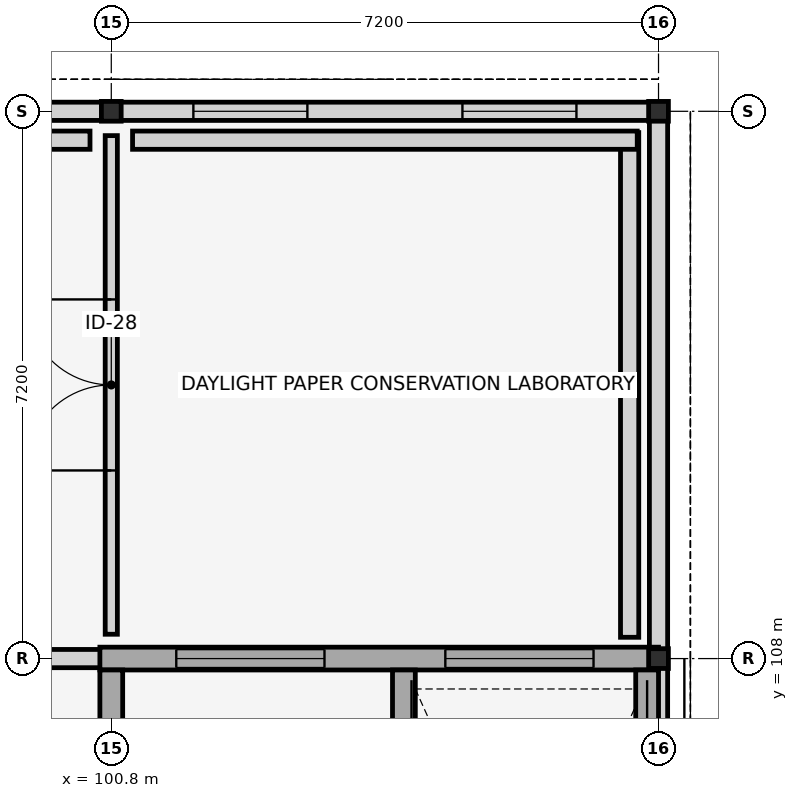
"""IFC4 building model, lengths in metres.
Left out: names, types, materials, properties, quantities, classifications, styles, units other than length and angle.
Written with IfcOpenShell. Run it as: python <this file> out.ifc"""

import sys

from ifc_helpers import new_model, si_unit, direction, frame, frame_2d, origin, origin_2d, place, context, subcontext, project, spatial, polyline, rectangle, i_section, outline, extrude, element, fill, save


model = new_model("IFC4")
c1 = context("Model", 3, precision=1e-05, world=origin(), true_north=direction((0.0, 1.0)))
c2 = subcontext(c1, "Body", "Model", "MODEL_VIEW")
j1 = project(units=[si_unit("LENGTHUNIT", "METRE"), si_unit("PLANEANGLEUNIT", "RADIAN")], contexts=[c1])
p1 = place(None, origin())
s1 = spatial("IfcSite", under=j1, at=p1, CompositionType="ELEMENT")
p2 = place(p1, origin())
s2 = spatial("IfcBuilding", under=s1, at=p2, CompositionType="ELEMENT")
p3 = place(p2, frame((0.0, 0.0, 25.2)))
s3 = spatial("IfcBuildingStorey", under=s2, at=p3, CompositionType="ELEMENT", Elevation=25.2)
for number, where, z_axis, x_axis in (
    (1, (100.8, 115.2, 0.0), (0.0, 0.0, 1.0), (0.0, 1.0, 0.0)),
    (2, (108.0, 108.0, 0.0), (0.0, 0.0, 1.0), (0.0, 1.0, 0.0)),
    (3, (108.0, 115.2, 0.0), (0.0, 0.0, 1.0), (1.0, 0.0, 0.0)),
):
    element("IfcColumn", number, at=place(p3, frame(where, z_axis=z_axis, x_axis=x_axis)), inside=s3, PredefinedType="COLUMN", context=c2, shape_type="SweptSolid", body=[
        extrude(i_section(OverallWidth=0.26, OverallDepth=0.26, WebThickness=0.01, FlangeThickness=0.018, FilletRadius=0.024, at=origin_2d()), origin(), (0.0, 0.0, 1.0), 5.4),
    ])
for number, where, z_axis, x_axis in (
    (4, (107.62, 108.28, 0.0), (0.0, 0.0, 1.0), (0.0, 1.0, 0.0)),
    (5, (107.72, 114.82, 0.0), (0.0, 0.0, 1.0), (-1.0, 0.0, 0.0)),
):
    element("IfcWall", number, at=place(p3, frame(where, z_axis=z_axis, x_axis=x_axis)), inside=s3, PredefinedType="STANDARD", context=c2, shape_type="SweptSolid", body=[
        extrude(rectangle(XDim=6.64, YDim=0.24, at=frame_2d((3.32, 0.0))), origin(), (0.0, 0.0, 1.0), 4.78),
    ])
p4 = place(p3, frame((100.52, 114.82, 0.0), z_axis=(0.0, 0.0, 1.0), x_axis=(-1.0, 0.0, 0.0)))
e6 = element("IfcWall", 6, at=p4, inside=s3, PredefinedType="STANDARD", context=c2, shape_type="SweptSolid", body=[
    extrude(rectangle(XDim=6.64, YDim=0.24, at=frame_2d((3.32, 0.0))), origin(), (0.0, 0.0, 1.0), 4.78),
])
p5 = place(p3, frame((100.74, 108.0, 5.42), z_axis=(0.0, 0.0, 1.0), x_axis=(-1.0, 0.0, 0.0)))
e7 = element("IfcWall", 7, at=p5, inside=s3, PredefinedType="STANDARD", context=c2, shape_type="SweptSolid", body=[
    extrude(rectangle(XDim=7.08, YDim=0.24, at=frame_2d((3.54, 0.0))), origin(), (0.0, 0.0, 1.0), 6.46),
])
p6 = place(p5, frame((0.87, 0.0, 0.7)))
e8 = element("IfcOpeningElement", 8, at=p6, cuts=e7, PredefinedType="OPENING", context=c2, shape_type="SweptSolid", body=[
    extrude(rectangle(XDim=1.8, YDim=2.4, at=frame_2d((0.9, 1.2))), frame((0.0, 0.13, 0.0), z_axis=(0.0, -1.0, 0.0), x_axis=(1.0, 0.0, 0.0)), (0.0, 0.0, 1.0), 0.26),
])
p7 = place(p5, frame((4.41, 0.0, 0.7)))
e9 = element("IfcOpeningElement", 9, at=p7, cuts=e7, PredefinedType="OPENING", context=c2, shape_type="SweptSolid", body=[
    extrude(rectangle(XDim=1.8, YDim=2.4, at=frame_2d((0.9, 1.2))), frame((0.0, 0.13, 0.0), z_axis=(0.0, -1.0, 0.0), x_axis=(1.0, 0.0, 0.0)), (0.0, 0.0, 1.0), 0.26),
])
p8 = place(p3, frame((107.94, 108.0, 5.42), z_axis=(0.0, 0.0, 1.0), x_axis=(-1.0, 0.0, 0.0)))
e10 = element("IfcWall", 10, at=p8, inside=s3, PredefinedType="STANDARD", context=c2, shape_type="SweptSolid", body=[
    extrude(rectangle(XDim=7.08, YDim=0.24, at=frame_2d((3.54, 0.0))), origin(), (0.0, 0.0, 1.0), 6.46),
])
p9 = place(p8, frame((0.795, 0.0, 0.7)))
e11 = element("IfcOpeningElement", 11, at=p9, cuts=e10, PredefinedType="OPENING", context=c2, shape_type="SweptSolid", body=[
    extrude(rectangle(XDim=1.95, YDim=2.5, at=frame_2d((0.975, 1.25))), frame((0.0, 0.13, 0.0), z_axis=(0.0, -1.0, 0.0), x_axis=(1.0, 0.0, 0.0)), (0.0, 0.0, 1.0), 0.26),
])
p10 = place(p8, frame((4.335, 0.0, 0.7)))
e12 = element("IfcOpeningElement", 12, at=p10, cuts=e10, PredefinedType="OPENING", context=c2, shape_type="SweptSolid", body=[
    extrude(rectangle(XDim=1.95, YDim=2.5, at=frame_2d((0.975, 1.25))), frame((0.0, 0.13, 0.0), z_axis=(0.0, -1.0, 0.0), x_axis=(1.0, 0.0, 0.0)), (0.0, 0.0, 1.0), 0.26),
])
p11 = place(p3, frame((108.0, 100.8, 5.42), z_axis=(0.0, 0.0, 1.0), x_axis=(0.0, 1.0, 0.0)))
e13 = element("IfcWall", 13, at=p11, inside=s3, PredefinedType="STANDARD", context=c2, shape_type="SweptSolid", body=[
    extrude(outline(polyline([(0.0, 0.0), (7.2, 0.0), (7.2, 6.46), (0.0, 0.13), (0.0, 0.0)])), frame((0.0, 0.12, 0.0), z_axis=(0.0, -1.0, 0.0), x_axis=(1.0, 0.0, 0.0)), (0.0, 0.0, 1.0), 0.24),
])
p12 = place(p3, frame((100.74, 115.2, 5.42), z_axis=(0.0, 0.0, 1.0), x_axis=(-1.0, 0.0, 0.0)))
e14 = element("IfcWall", 14, at=p12, inside=s3, PredefinedType="STANDARD", context=c2, shape_type="SweptSolid", body=[
    extrude(rectangle(XDim=7.08, YDim=0.24, at=frame_2d((3.54, 0.0))), origin(), (0.0, 0.0, 1.0), 6.46),
])
p13 = place(p12, frame((0.795, 0.0, 0.7)))
e15 = element("IfcOpeningElement", 15, at=p13, cuts=e14, PredefinedType="OPENING", context=c2, shape_type="SweptSolid", body=[
    extrude(rectangle(XDim=1.95, YDim=2.5, at=frame_2d((0.975, 1.25))), frame((0.0, 0.13, 0.0), z_axis=(0.0, -1.0, 0.0), x_axis=(1.0, 0.0, 0.0)), (0.0, 0.0, 1.0), 0.26),
])
p14 = place(p12, frame((4.335, 0.0, 0.7)))
e16 = element("IfcOpeningElement", 16, at=p14, cuts=e14, PredefinedType="OPENING", context=c2, shape_type="SweptSolid", body=[
    extrude(rectangle(XDim=1.95, YDim=2.5, at=frame_2d((0.975, 1.25))), frame((0.0, 0.13, 0.0), z_axis=(0.0, -1.0, 0.0), x_axis=(1.0, 0.0, 0.0)), (0.0, 0.0, 1.0), 0.26),
])
p15 = place(p3, frame((107.94, 115.2, 5.42), z_axis=(0.0, 0.0, 1.0), x_axis=(-1.0, 0.0, 0.0)))
e17 = element("IfcWall", 17, at=p15, inside=s3, PredefinedType="STANDARD", context=c2, shape_type="SweptSolid", body=[
    extrude(rectangle(XDim=7.08, YDim=0.24, at=frame_2d((3.54, 0.0))), origin(), (0.0, 0.0, 1.0), 6.46),
])
p16 = place(p15, frame((1.02, 0.0, 0.7)))
e18 = element("IfcOpeningElement", 18, at=p16, cuts=e17, PredefinedType="OPENING", context=c2, shape_type="SweptSolid", body=[
    extrude(rectangle(XDim=1.5, YDim=2.1, at=frame_2d((0.75, 1.05))), frame((0.0, 0.13, 0.0), z_axis=(0.0, -1.0, 0.0), x_axis=(1.0, 0.0, 0.0)), (0.0, 0.0, 1.0), 0.26),
])
p17 = place(p15, frame((4.56, 0.0, 0.7)))
e19 = element("IfcOpeningElement", 19, at=p17, cuts=e17, PredefinedType="OPENING", context=c2, shape_type="SweptSolid", body=[
    extrude(rectangle(XDim=1.5, YDim=2.1, at=frame_2d((0.75, 1.05))), frame((0.0, 0.13, 0.0), z_axis=(0.0, -1.0, 0.0), x_axis=(1.0, 0.0, 0.0)), (0.0, 0.0, 1.0), 0.26),
])
p18 = place(p3, frame((108.0, 108.0, 5.42), z_axis=(0.0, 0.0, 1.0), x_axis=(0.0, 1.0, 0.0)))
e20 = element("IfcWall", 20, at=p18, inside=s3, PredefinedType="STANDARD", context=c2, shape_type="SweptSolid", body=[
    extrude(outline(polyline([(0.0, 0.0), (7.2, 0.0), (7.2, 6.46), (0.0, 0.13), (0.0, 0.0)])), frame((0.0, 0.12, 0.0), z_axis=(0.0, -1.0, 0.0), x_axis=(1.0, 0.0, 0.0)), (0.0, 0.0, 1.0), 0.24),
])
p19 = place(p3, frame((100.65, 108.0, 0.0), z_axis=(0.0, 0.0, 1.0), x_axis=(1.0, 0.0, 0.0)))
e21 = element("IfcWall", 21, at=p19, inside=s3, PredefinedType="SHEAR", context=c2, shape_type="SweptSolid", body=[
    extrude(rectangle(XDim=7.35, YDim=0.3, at=frame_2d((3.675, 0.0))), origin(), (0.0, 0.0, 1.0), 5.18),
])
p20 = place(p3, frame((107.85, 93.75, 0.0), z_axis=(0.0, 0.0, 1.0), x_axis=(0.0, 1.0, 0.0)))
e22 = element("IfcWall", 22, at=p20, inside=s3, PredefinedType="SHEAR", context=c2, shape_type="SweptSolid", body=[
    extrude(rectangle(XDim=14.1, YDim=0.3, at=frame_2d((7.05, 0.0))), origin(), (0.0, 0.0, 1.0), 5.18),
])
p21 = place(p3, frame((100.8, 93.75, 0.0), z_axis=(0.0, 0.0, 1.0), x_axis=(0.0, 1.0, 0.0)))
e23 = element("IfcWall", 23, at=p21, inside=s3, PredefinedType="SHEAR", context=c2, shape_type="SweptSolid", body=[
    extrude(rectangle(XDim=14.1, YDim=0.3, at=frame_2d((7.05, 0.0))), origin(), (0.0, 0.0, 1.0), 5.18),
])
p22 = place(p21, frame((3.55, 0.0, 0.0)))
e24 = element("IfcOpeningElement", 24, at=p22, cuts=e23, PredefinedType="OPENING", context=c2, shape_type="SweptSolid", body=[
    extrude(rectangle(XDim=1.3, YDim=2.2, at=frame_2d((0.65, 1.1))), frame((0.0, 0.16, 0.0), z_axis=(0.0, -1.0, 0.0), x_axis=(1.0, 0.0, 0.0)), (0.0, 0.0, 1.0), 0.32),
])
p23 = place(p21, frame((7.85, 0.0, 0.0)))
e25 = element("IfcOpeningElement", 25, at=p23, cuts=e23, PredefinedType="OPENING", context=c2, shape_type="SweptSolid", body=[
    extrude(rectangle(XDim=1.05, YDim=2.15, at=frame_2d((0.525, 1.075))), frame((0.0, 0.16, 0.0), z_axis=(0.0, -1.0, 0.0), x_axis=(1.0, 0.0, 0.0)), (0.0, 0.0, 1.0), 0.32),
])
p24 = place(p21, frame((10.55, 0.0, 0.0)))
e26 = element("IfcOpeningElement", 26, at=p24, cuts=e23, PredefinedType="OPENING", context=c2, shape_type="SweptSolid", body=[
    extrude(rectangle(XDim=1.0, YDim=2.15, at=frame_2d((0.5, 1.075))), frame((0.0, 0.16, 0.0), z_axis=(0.0, -1.0, 0.0), x_axis=(1.0, 0.0, 0.0)), (0.0, 0.0, 1.0), 0.32),
])
p25 = place(p3, frame((104.65, 98.94, 0.0), z_axis=(0.0, 0.0, 1.0), x_axis=(0.0, 1.0, 0.0)))
e27 = element("IfcWall", 27, at=p25, inside=s3, PredefinedType="SHEAR", context=c2, shape_type="SweptSolid", body=[
    extrude(rectangle(XDim=8.91, YDim=0.3, at=frame_2d((4.455, 0.0))), origin(), (0.0, 0.0, 1.0), 5.18),
])
p26 = place(p3, frame((100.8, 108.32, 0.0), z_axis=(0.0, 0.0, 1.0), x_axis=(0.0, 1.0, 0.0)))
e28 = element("IfcWall", 28, at=p26, inside=s3, PredefinedType="PARTITIONING", context=c2, shape_type="SweptSolid", body=[
    extrude(rectangle(XDim=6.56, YDim=0.16, at=frame_2d((3.28, 0.0))), origin(), (0.0, 0.0, 1.0), 4.35),
])
p27 = place(p26, frame((2.155, 0.0, 0.0)))
e29 = element("IfcOpeningElement", 29, at=p27, cuts=e28, PredefinedType="OPENING", context=c2, shape_type="SweptSolid", body=[
    extrude(rectangle(XDim=2.25, YDim=2.7, at=frame_2d((1.125, 1.35))), frame((0.0, 0.09, 0.0), z_axis=(0.0, -1.0, 0.0), x_axis=(1.0, 0.0, 0.0)), (0.0, 0.0, 1.0), 0.18),
])
p28 = place(p9, origin())
e30 = element("IfcWindow", 30, at=p28, inside=s3, PartitioningType="SINGLE_PANEL", PredefinedType="SKYLIGHT", context=c2, shape_type="SweptSolid", body=[
    extrude(rectangle(XDim=1.95, YDim=2.5, at=frame_2d((0.975, 1.25))), frame((0.0, 0.03, 0.0), z_axis=(0.0, -1.0, 0.0), x_axis=(1.0, 0.0, 0.0)), (0.0, 0.0, 1.0), 0.06),
])
fill(e11, e30)
p29 = place(p10, origin())
e31 = element("IfcWindow", 31, at=p29, inside=s3, PartitioningType="SINGLE_PANEL", PredefinedType="SKYLIGHT", context=c2, shape_type="SweptSolid", body=[
    extrude(rectangle(XDim=1.95, YDim=2.5, at=frame_2d((0.975, 1.25))), frame((0.0, 0.03, 0.0), z_axis=(0.0, -1.0, 0.0), x_axis=(1.0, 0.0, 0.0)), (0.0, 0.0, 1.0), 0.06),
])
fill(e12, e31)
p30 = place(p16, origin())
e32 = element("IfcWindow", 32, at=p30, inside=s3, PartitioningType="SINGLE_PANEL", PredefinedType="SKYLIGHT", context=c2, shape_type="SweptSolid", body=[
    extrude(rectangle(XDim=1.5, YDim=2.1, at=frame_2d((0.75, 1.05))), frame((0.0, 0.03, 0.0), z_axis=(0.0, -1.0, 0.0), x_axis=(1.0, 0.0, 0.0)), (0.0, 0.0, 1.0), 0.06),
])
fill(e18, e32)
p31 = place(p17, origin())
e33 = element("IfcWindow", 33, at=p31, inside=s3, PartitioningType="SINGLE_PANEL", PredefinedType="SKYLIGHT", context=c2, shape_type="SweptSolid", body=[
    extrude(rectangle(XDim=1.5, YDim=2.1, at=frame_2d((0.75, 1.05))), frame((0.0, 0.03, 0.0), z_axis=(0.0, -1.0, 0.0), x_axis=(1.0, 0.0, 0.0)), (0.0, 0.0, 1.0), 0.06),
])
fill(e19, e33)
p32 = place(p27, origin())
e34 = element("IfcDoor", 34, at=p32, inside=s3, OperationType="DOUBLE_DOOR_SINGLE_SWING", PredefinedType="DOOR", context=c2, shape_type="SweptSolid", body=[
    extrude(rectangle(XDim=2.25, YDim=2.7, at=frame_2d((1.125, 1.35))), frame((0.0, 0.025, 0.0), z_axis=(0.0, -1.0, 0.0), x_axis=(1.0, 0.0, 0.0)), (0.0, 0.0, 1.0), 0.05),
])
fill(e29, e34)
save(model, sys.argv[1])
